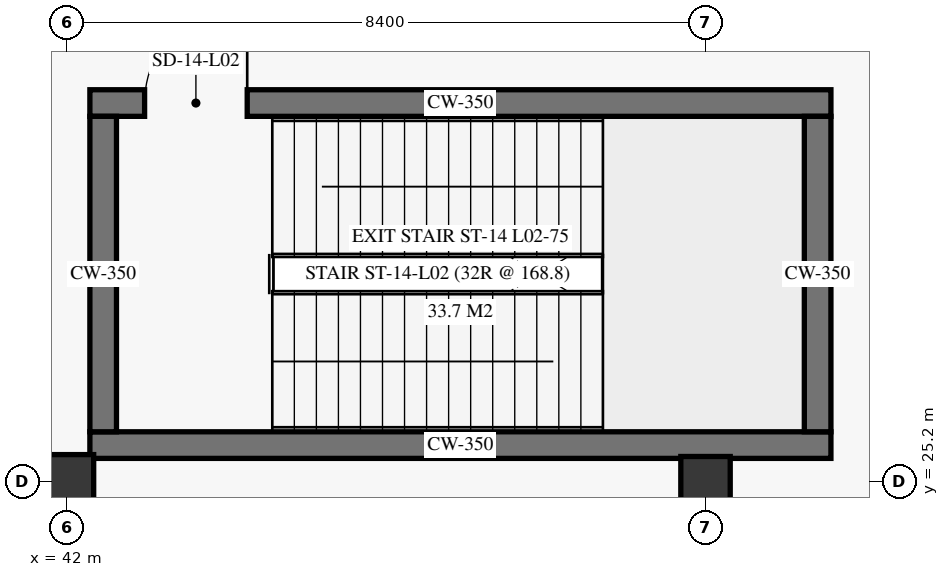
"""IFC4 building model, lengths in metres.
Left out: names, types, materials, properties, quantities, classifications, styles, units other than length and angle.
Written with IfcOpenShell. Run it as: python <this file> out.ifc"""

import sys

from ifc_helpers import new_model, si_unit, direction, frame, frame_2d, origin, origin_2d, place, context, subcontext, project, spatial, rectangle, extrude, element, fill, save


model = new_model("IFC4")
c1 = context("Model", 3, precision=1e-05, world=origin(), true_north=direction((0.0, 1.0)))
c2 = subcontext(c1, "Body", "Model", "MODEL_VIEW")
j1 = project(units=[si_unit("LENGTHUNIT", "METRE"), si_unit("PLANEANGLEUNIT", "RADIAN")], contexts=[c1])
p1 = place(None, origin())
s1 = spatial("IfcSite", under=j1, at=p1, CompositionType="ELEMENT")
p2 = place(p1, origin())
s2 = spatial("IfcBuilding", under=s1, at=p2, CompositionType="ELEMENT")
p3 = place(p2, frame((0.0, 0.0, 6.0)))
s3 = spatial("IfcBuildingStorey", under=s2, at=p3, CompositionType="ELEMENT", Elevation=6.0)
p4 = place(p3, frame((42.0, 25.2, 0.0), z_axis=(0.0, 0.0, 1.0), x_axis=(1.0, 0.0, 0.0)))
e1 = element("IfcColumn", 1, at=p4, inside=s3, PredefinedType="COLUMN", context=c2, shape_type="SweptSolid", body=[
    extrude(rectangle(XDim=0.7, YDim=0.7, at=origin_2d()), origin(), (0.0, 0.0, 1.0), 5.1),
])
p5 = place(p3, frame((50.4, 25.2, 0.0), z_axis=(0.0, 0.0, 1.0), x_axis=(1.0, 0.0, 0.0)))
e2 = element("IfcColumn", 2, at=p5, inside=s3, PredefinedType="COLUMN", context=c2, shape_type="SweptSolid", body=[
    extrude(rectangle(XDim=0.65, YDim=0.65, at=origin_2d()), origin(), (0.0, 0.0, 1.0), 5.1),
])
p6 = place(p3, frame((42.3, 25.675, 0.0), z_axis=(0.0, 0.0, 1.0), x_axis=(1.0, 0.0, 0.0)))
e3 = element("IfcWall", 3, at=p6, inside=s3, PredefinedType="SHEAR", context=c2, shape_type="SweptSolid", body=[
    extrude(rectangle(XDim=9.75, YDim=0.35, at=frame_2d((4.875, 0.0))), origin(), (0.0, 0.0, 1.0), 5.1),
])
p7 = place(p3, frame((42.3, 30.175, 0.0), z_axis=(0.0, 0.0, 1.0), x_axis=(1.0, 0.0, 0.0)))
e4 = element("IfcWall", 4, at=p7, inside=s3, PredefinedType="SHEAR", context=c2, shape_type="SweptSolid", body=[
    extrude(rectangle(XDim=9.75, YDim=0.35, at=frame_2d((4.875, 0.0))), origin(), (0.0, 0.0, 1.0), 5.1),
])
p8 = place(p7, frame((0.72, 0.0, 0.0)))
e5 = element("IfcOpeningElement", 5, at=p8, cuts=e4, PredefinedType="OPENING", context=c2, shape_type="SweptSolid", body=[
    extrude(rectangle(XDim=1.35, YDim=2.25, at=frame_2d((0.675, 1.125))), frame((0.0, 0.185, 0.0), z_axis=(0.0, -1.0, 0.0), x_axis=(1.0, 0.0, 0.0)), (0.0, 0.0, 1.0), 0.37),
])
for number, where, z_axis, x_axis in (
    (6, (42.475, 25.85, 0.0), (0.0, 0.0, 1.0), (0.0, 1.0, 0.0)),
    (7, (51.875, 25.85, 0.0), (0.0, 0.0, 1.0), (0.0, 1.0, 0.0)),
):
    element("IfcWall", number, at=place(p3, frame(where, z_axis=z_axis, x_axis=x_axis)), inside=s3, PredefinedType="SHEAR", context=c2, shape_type="SweptSolid", body=[
        extrude(rectangle(XDim=4.15, YDim=0.35, at=frame_2d((2.075, 0.0))), origin(), (0.0, 0.0, 1.0), 5.1),
    ])
p9 = place(p8, origin())
e8 = element("IfcDoor", 8, at=p9, inside=s3, OperationType="SINGLE_SWING_RIGHT", PredefinedType="DOOR", context=c2, shape_type="SweptSolid", body=[
    extrude(rectangle(XDim=1.35, YDim=2.25, at=frame_2d((0.675, 1.125))), frame((0.0, 0.025, 0.0), z_axis=(0.0, -1.0, 0.0), x_axis=(1.0, 0.0, 0.0)), (0.0, 0.0, 1.0), 0.05),
])
fill(e5, e8)
save(model, sys.argv[1])
